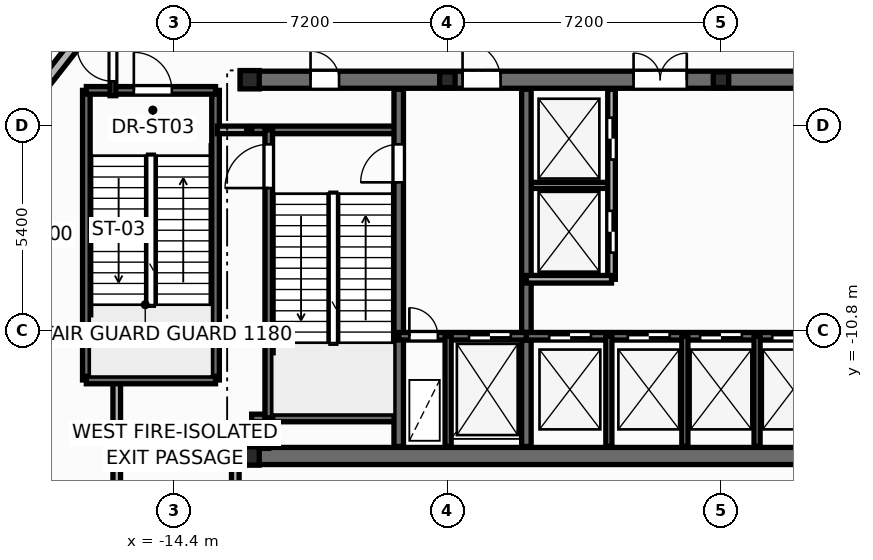
"""IFC4 building model, lengths in metres.
Left out: names, types, materials, properties, quantities, classifications, styles, units other than length and angle.
Written with IfcOpenShell. Run it as: python <this file> out.ifc"""

import sys

from ifc_helpers import new_model, si_unit, direction, frame, frame_2d, origin, origin_2d, place, context, subcontext, project, spatial, rectangle, i_section, extrude, element, fill, save


model = new_model("IFC4")
c1 = context("Model", 3, precision=1e-05, world=origin(), true_north=direction((0.0, 1.0)))
c2 = subcontext(c1, "Body", "Model", "MODEL_VIEW")
j1 = project(units=[si_unit("LENGTHUNIT", "METRE"), si_unit("PLANEANGLEUNIT", "RADIAN")], contexts=[c1])
p1 = place(None, origin())
s1 = spatial("IfcSite", under=j1, at=p1, CompositionType="ELEMENT")
p2 = place(p1, origin())
s2 = spatial("IfcBuilding", under=s1, at=p2, CompositionType="ELEMENT")
p3 = place(p2, origin())
s3 = spatial("IfcBuildingStorey", under=s2, at=p3, CompositionType="ELEMENT", Elevation=0.0)
for number, where, z_axis, x_axis in (
    (1, (-12.4, -14.1, 0.0), (0.0, 0.0, 1.0), (1.0, 0.0, 0.0)),
    (2, (-12.4, -4.2, 0.0), (0.0, 0.0, 1.0), (1.0, 0.0, 0.0)),
):
    element("IfcColumn", number, at=place(p3, frame(where, z_axis=z_axis, x_axis=x_axis)), inside=s3, PredefinedType="COLUMN", context=c2, shape_type="SweptSolid", body=[
        extrude(i_section(OverallWidth=0.5, OverallDepth=0.482, WebThickness=0.04, FlangeThickness=0.045, at=origin_2d()), origin(), (0.0, 0.0, 1.0), 5.4),
    ])
for number, where, z_axis, x_axis in (
    (3, (-7.2, -4.2, 0.0), (0.0, 0.0, 1.0), (1.0, 0.0, 0.0)),
    (4, (0.0, -4.2, 0.0), (0.0, 0.0, 1.0), (1.0, 0.0, 0.0)),
):
    element("IfcColumn", number, at=place(p3, frame(where, z_axis=z_axis, x_axis=x_axis)), inside=s3, PredefinedType="PILASTER", context=c2, shape_type="SweptSolid", body=[
        extrude(i_section(OverallWidth=0.405, OverallDepth=0.414, WebThickness=0.022, FlangeThickness=0.032, at=origin_2d()), origin(), (0.0, 0.0, 1.0), 5.4),
    ])
p4 = place(p3, frame((-23.245, -11.24, -0.015), z_axis=(0.0, 0.0, 1.0), x_axis=(0.616945483616, 0.787005889588, 0.0)))
e5 = element("IfcWall", 5, at=p4, inside=s3, PredefinedType="STANDARD", context=c2, shape_type="SweptSolid", body=[
    extrude(rectangle(XDim=28.627, YDim=0.28, at=frame_2d((14.314, 0.0))), origin(), (0.0, 0.0, 1.0), 3.91),
])
p5 = place(p3, frame((-5.12, -6.98, 0.0), z_axis=(0.0, 0.0, 1.0), x_axis=(1.0, 0.0, 0.0)))
e6 = element("IfcWall", 6, at=p5, inside=s3, PredefinedType="PARTITIONING", context=c2, shape_type="SweptSolid", body=[
    extrude(rectangle(XDim=2.24, YDim=0.16, at=frame_2d((1.12, 0.0))), origin(), (0.0, 0.0, 1.0), 5.12),
])
p6 = place(p3, frame((-12.75, -14.1, 0.0), z_axis=(0.0, 0.0, 1.0), x_axis=(1.0, 0.0, 0.0)))
e7 = element("IfcWall", 7, at=p6, inside=s3, PredefinedType="SHEAR", context=c2, shape_type="SweptSolid", body=[
    extrude(rectangle(XDim=25.5, YDim=0.45, at=frame_2d((12.75, 0.0))), origin(), (0.0, 0.0, 1.0), 5.4),
])
p7 = place(p3, frame((-12.65, -4.2, 0.0), z_axis=(0.0, 0.0, 1.0), x_axis=(1.0, 0.0, 0.0)))
e8 = element("IfcWall", 8, at=p7, inside=s3, PredefinedType="SHEAR", context=c2, shape_type="SweptSolid", body=[
    extrude(rectangle(XDim=25.3, YDim=0.45, at=frame_2d((12.65, 0.0))), origin(), (0.0, 0.0, 1.0), 5.4),
])
p8 = place(p7, frame((1.85, 0.0, 0.0)))
e9 = element("IfcOpeningElement", 9, at=p8, cuts=e8, PredefinedType="OPENING", context=c2, shape_type="SweptSolid", body=[
    extrude(rectangle(XDim=0.756, YDim=2.054, at=frame_2d((0.375, 1.027))), frame((0.0, 0.235, 0.0), z_axis=(0.0, -1.0, 0.0), x_axis=(1.0, 0.0, 0.0)), (0.0, 0.0, 1.0), 0.47),
])
p9 = place(p7, frame((22.65, 0.0, 0.0)))
e10 = element("IfcOpeningElement", 10, at=p9, cuts=e8, PredefinedType="OPENING", context=c2, shape_type="SweptSolid", body=[
    extrude(rectangle(XDim=0.756, YDim=2.054, at=frame_2d((0.375, 1.027))), frame((0.0, 0.235, 0.0), z_axis=(0.0, -1.0, 0.0), x_axis=(1.0, 0.0, 0.0)), (0.0, 0.0, 1.0), 0.47),
])
p10 = place(p7, frame((5.85, 0.0, 0.0)))
e11 = element("IfcOpeningElement", 11, at=p10, cuts=e8, PredefinedType="OPENING", context=c2, shape_type="SweptSolid", body=[
    extrude(rectangle(XDim=1.006, YDim=2.104, at=frame_2d((0.5, 1.052))), frame((0.0, 0.235, 0.0), z_axis=(0.0, -1.0, 0.0), x_axis=(1.0, 0.0, 0.0)), (0.0, 0.0, 1.0), 0.47),
])
p11 = place(p7, frame((10.35, 0.0, 0.0)))
e12 = element("IfcOpeningElement", 12, at=p11, cuts=e8, PredefinedType="OPENING", context=c2, shape_type="SweptSolid", body=[
    extrude(rectangle(XDim=1.406, YDim=2.154, at=frame_2d((0.7, 1.077))), frame((0.0, 0.235, 0.0), z_axis=(0.0, -1.0, 0.0), x_axis=(1.0, 0.0, 0.0)), (0.0, 0.0, 1.0), 0.47),
])
p12 = place(p7, frame((18.45, 0.0, 0.0)))
e13 = element("IfcOpeningElement", 13, at=p12, cuts=e8, PredefinedType="OPENING", context=c2, shape_type="SweptSolid", body=[
    extrude(rectangle(XDim=1.006, YDim=2.104, at=frame_2d((0.5, 1.052))), frame((0.0, 0.235, 0.0), z_axis=(0.0, -1.0, 0.0), x_axis=(1.0, 0.0, 0.0)), (0.0, 0.0, 1.0), 0.47),
])
for number, where, z_axis, x_axis in (
    (14, (-12.35, -5.52, 0.0), (0.0, 0.0, 1.0), (1.0, 0.0, 0.0)),
    (15, (-12.35, -13.1, 0.0), (0.0, 0.0, 1.0), (1.0, 0.0, 0.0)),
):
    element("IfcWall", number, at=place(p3, frame(where, z_axis=z_axis, x_axis=x_axis)), inside=s3, PredefinedType="SOLIDWALL", context=c2, shape_type="SweptSolid", body=[
        extrude(rectangle(XDim=3.87, YDim=0.2, at=frame_2d((1.935, 0.0))), origin(), (0.0, 0.0, 1.0), 5.4),
    ])
p13 = place(p3, frame((-11.9, -13.1, 0.0), z_axis=(0.0, 0.0, 1.0), x_axis=(0.0, 1.0, 0.0)))
e16 = element("IfcWall", 16, at=p13, inside=s3, PredefinedType="SOLIDWALL", context=c2, shape_type="SweptSolid", body=[
    extrude(rectangle(XDim=7.58, YDim=0.2, at=frame_2d((3.79, 0.0))), origin(), (0.0, 0.0, 1.0), 5.4),
])
p14 = place(p13, frame((6.05, 0.0, 0.0)))
e17 = element("IfcOpeningElement", 17, at=p14, cuts=e16, PredefinedType="OPENING", context=c2, shape_type="SweptSolid", body=[
    extrude(rectangle(XDim=1.156, YDim=2.154, at=frame_2d((0.575, 1.077))), frame((0.0, 0.11, 0.0), z_axis=(0.0, -1.0, 0.0), x_axis=(1.0, 0.0, 0.0)), (0.0, 0.0, 1.0), 0.22),
])
p15 = place(p3, frame((-8.48, -13.85, 0.0), z_axis=(0.0, 0.0, 1.0), x_axis=(0.0, 1.0, 0.0)))
e18 = element("IfcWall", 18, at=p15, inside=s3, PredefinedType="SHEAR", context=c2, shape_type="SweptSolid", body=[
    extrude(rectangle(XDim=9.4, YDim=0.25, at=frame_2d((4.7, 0.0))), origin(), (0.0, 0.0, 1.0), 5.4),
])
p16 = place(p15, frame((6.95, 0.0, 0.0)))
e19 = element("IfcOpeningElement", 19, at=p16, cuts=e18, PredefinedType="OPENING", context=c2, shape_type="SweptSolid", body=[
    extrude(rectangle(XDim=1.006, YDim=2.104, at=frame_2d((0.5, 1.052))), frame((0.0, 0.135, 0.0), z_axis=(0.0, -1.0, 0.0), x_axis=(1.0, 0.0, 0.0)), (0.0, 0.0, 1.0), 0.27),
])
p17 = place(p3, frame((-5.12, -13.85, 0.0), z_axis=(0.0, 0.0, 1.0), x_axis=(0.0, 1.0, 0.0)))
e20 = element("IfcWall", 20, at=p17, inside=s3, PredefinedType="SHEAR", context=c2, shape_type="SweptSolid", body=[
    extrude(rectangle(XDim=9.4, YDim=0.25, at=frame_2d((4.7, 0.0))), origin(), (0.0, 0.0, 1.0), 5.4),
])
p18 = place(p3, frame((-8.48, -10.95, 0.0), z_axis=(0.0, 0.0, 1.0), x_axis=(1.0, 0.0, 0.0)))
e21 = element("IfcWall", 21, at=p18, inside=s3, PredefinedType="SOLIDWALL", context=c2, shape_type="SweptSolid", body=[
    extrude(rectangle(XDim=3.36, YDim=0.2, at=frame_2d((1.68, 0.0))), origin(), (0.0, 0.0, 1.0), 5.4),
])
p19 = place(p18, frame((0.28, 0.0, 0.0)))
e22 = element("IfcOpeningElement", 22, at=p19, cuts=e21, PredefinedType="OPENING", context=c2, shape_type="SweptSolid", body=[
    extrude(rectangle(XDim=0.756, YDim=2.054, at=frame_2d((0.375, 1.027))), frame((0.0, 0.11, 0.0), z_axis=(0.0, -1.0, 0.0), x_axis=(1.0, 0.0, 0.0)), (0.0, 0.0, 1.0), 0.22),
])
p20 = place(p18, frame((1.85, 0.0, 0.0)))
e23 = element("IfcOpeningElement", 23, at=p20, cuts=e21, PredefinedType="OPENING", context=c2, shape_type="SweptSolid", body=[
    extrude(rectangle(XDim=1.106, YDim=2.104, at=frame_2d((0.55, 1.052))), frame((0.0, 0.11, 0.0), z_axis=(0.0, -1.0, 0.0), x_axis=(1.0, 0.0, 0.0)), (0.0, 0.0, 1.0), 0.22),
])
p21 = place(p3, frame((-5.12, -10.95, 0.0), z_axis=(0.0, 0.0, 1.0), x_axis=(1.0, 0.0, 0.0)))
e24 = element("IfcWall", 24, at=p21, inside=s3, PredefinedType="SOLIDWALL", context=c2, shape_type="SweptSolid", body=[
    extrude(rectangle(XDim=10.24, YDim=0.2, at=frame_2d((5.12, 0.0))), origin(), (0.0, 0.0, 1.0), 5.4),
])
p22 = place(p21, frame((0.6, 0.0, 0.0)))
e25 = element("IfcOpeningElement", 25, at=p22, cuts=e24, PredefinedType="OPENING", context=c2, shape_type="SweptSolid", body=[
    extrude(rectangle(XDim=1.106, YDim=2.104, at=frame_2d((0.55, 1.052))), frame((0.0, 0.11, 0.0), z_axis=(0.0, -1.0, 0.0), x_axis=(1.0, 0.0, 0.0)), (0.0, 0.0, 1.0), 0.22),
])
p23 = place(p21, frame((2.67, 0.0, 0.0)))
e26 = element("IfcOpeningElement", 26, at=p23, cuts=e24, PredefinedType="OPENING", context=c2, shape_type="SweptSolid", body=[
    extrude(rectangle(XDim=1.106, YDim=2.104, at=frame_2d((0.55, 1.052))), frame((0.0, 0.11, 0.0), z_axis=(0.0, -1.0, 0.0), x_axis=(1.0, 0.0, 0.0)), (0.0, 0.0, 1.0), 0.22),
])
p24 = place(p21, frame((4.57, 0.0, 0.0)))
e27 = element("IfcOpeningElement", 27, at=p24, cuts=e24, PredefinedType="OPENING", context=c2, shape_type="SweptSolid", body=[
    extrude(rectangle(XDim=1.106, YDim=2.104, at=frame_2d((0.55, 1.052))), frame((0.0, 0.11, 0.0), z_axis=(0.0, -1.0, 0.0), x_axis=(1.0, 0.0, 0.0)), (0.0, 0.0, 1.0), 0.22),
])
p25 = place(p21, frame((6.47, 0.0, 0.0)))
e28 = element("IfcOpeningElement", 28, at=p25, cuts=e24, PredefinedType="OPENING", context=c2, shape_type="SweptSolid", body=[
    extrude(rectangle(XDim=1.106, YDim=2.104, at=frame_2d((0.55, 1.052))), frame((0.0, 0.11, 0.0), z_axis=(0.0, -1.0, 0.0), x_axis=(1.0, 0.0, 0.0)), (0.0, 0.0, 1.0), 0.22),
])
p26 = place(p21, frame((8.54, 0.0, 0.0)))
e29 = element("IfcOpeningElement", 29, at=p26, cuts=e24, PredefinedType="OPENING", context=c2, shape_type="SweptSolid", body=[
    extrude(rectangle(XDim=1.106, YDim=2.104, at=frame_2d((0.55, 1.052))), frame((0.0, 0.11, 0.0), z_axis=(0.0, -1.0, 0.0), x_axis=(1.0, 0.0, 0.0)), (0.0, 0.0, 1.0), 0.22),
])
for number, where, z_axis, x_axis in (
    (30, (-7.18, -13.85, 0.0), (0.0, 0.0, 1.0), (0.0, 1.0, 0.0)),
    (31, (-2.95, -13.85, 0.0), (0.0, 0.0, 1.0), (0.0, 1.0, 0.0)),
):
    element("IfcWall", number, at=place(p3, frame(where, z_axis=z_axis, x_axis=x_axis)), inside=s3, PredefinedType="PARTITIONING", context=c2, shape_type="SweptSolid", body=[
        extrude(rectangle(XDim=2.9, YDim=0.16, at=frame_2d((1.45, 0.0))), origin(), (0.0, 0.0, 1.0), 4.145),
    ])
p27 = place(p3, frame((-2.88, -9.45, 0.0), z_axis=(0.0, 0.0, 1.0), x_axis=(0.0, 1.0, 0.0)))
e32 = element("IfcWall", 32, at=p27, inside=s3, PredefinedType="SOLIDWALL", context=c2, shape_type="SweptSolid", body=[
    extrude(rectangle(XDim=5.0, YDim=0.2, at=frame_2d((2.5, 0.0))), origin(), (0.0, 0.0, 1.0), 5.12),
])
p28 = place(p27, frame((0.7, 0.0, 0.0)))
e33 = element("IfcOpeningElement", 33, at=p28, cuts=e32, PredefinedType="OPENING", context=c2, shape_type="SweptSolid", body=[
    extrude(rectangle(XDim=1.106, YDim=2.104, at=frame_2d((0.55, 1.052))), frame((0.0, 0.11, 0.0), z_axis=(0.0, -1.0, 0.0), x_axis=(1.0, 0.0, 0.0)), (0.0, 0.0, 1.0), 0.22),
])
p29 = place(p27, frame((3.15, 0.0, 0.0)))
e34 = element("IfcOpeningElement", 34, at=p29, cuts=e32, PredefinedType="OPENING", context=c2, shape_type="SweptSolid", body=[
    extrude(rectangle(XDim=1.106, YDim=2.104, at=frame_2d((0.55, 1.052))), frame((0.0, 0.11, 0.0), z_axis=(0.0, -1.0, 0.0), x_axis=(1.0, 0.0, 0.0)), (0.0, 0.0, 1.0), 0.22),
])
p30 = place(p3, frame((-5.12, -9.45, 0.0), z_axis=(0.0, 0.0, 1.0), x_axis=(1.0, 0.0, 0.0)))
e35 = element("IfcWall", 35, at=p30, inside=s3, PredefinedType="SOLIDWALL", context=c2, shape_type="SweptSolid", body=[
    extrude(rectangle(XDim=2.24, YDim=0.2, at=frame_2d((1.12, 0.0))), origin(), (0.0, 0.0, 1.0), 5.12),
])
for number, where, z_axis, x_axis in (
    (36, (-0.95, -13.85, 0.0), (0.0, 0.0, 1.0), (0.0, 1.0, 0.0)),
    (37, (0.95, -13.85, 0.0), (0.0, 0.0, 1.0), (0.0, 1.0, 0.0)),
):
    element("IfcWall", number, at=place(p3, frame(where, z_axis=z_axis, x_axis=x_axis)), inside=s3, PredefinedType="PARTITIONING", context=c2, shape_type="SweptSolid", body=[
        extrude(rectangle(XDim=2.9, YDim=0.16, at=frame_2d((1.45, 0.0))), origin(), (0.0, 0.0, 1.0), 4.145),
    ])
for number, where, z_axis, x_axis in (
    (38, (-16.7, -12.1, 0.0), (0.0, 0.0, 1.0), (0.0, 1.0, 0.0)),
    (39, (-13.3, -12.1, 0.0), (0.0, 0.0, 1.0), (0.0, 1.0, 0.0)),
):
    element("IfcWall", number, at=place(p3, frame(where, z_axis=z_axis, x_axis=x_axis)), inside=s3, PredefinedType="SOLIDWALL", context=c2, shape_type="SweptSolid", body=[
        extrude(rectangle(XDim=7.62, YDim=0.2, at=frame_2d((3.81, 0.0))), origin(), (0.0, 0.0, 1.0), 5.4),
    ])
p31 = place(p3, frame((-22.862, -10.8, 0.0), z_axis=(0.0, 0.0, 1.0), x_axis=(1.0, 0.0, 0.0)))
e40 = element("IfcWall", 40, at=p31, inside=s3, PredefinedType="PARTITIONING", context=c2, shape_type="SweptSolid", body=[
    extrude(rectangle(XDim=6.222, YDim=0.15, at=frame_2d((3.111, 0.0))), origin(), (0.0, 0.0, 1.0), 5.12),
])
p32 = place(p31, frame((0.758, 0.0, 0.0)))
e41 = element("IfcOpeningElement", 41, at=p32, cuts=e40, PredefinedType="OPENING", context=c2, shape_type="SweptSolid", body=[
    extrude(rectangle(XDim=0.956, YDim=2.104, at=frame_2d((0.475, 1.052))), frame((0.0, 0.085, 0.0), z_axis=(0.0, -1.0, 0.0), x_axis=(1.0, 0.0, 0.0)), (0.0, 0.0, 1.0), 0.17),
])
p33 = place(p3, frame((-15.9, -17.85, 0.0), z_axis=(0.0, 0.0, 1.0), x_axis=(0.0, 1.0, 0.0)))
e42 = element("IfcWall", 42, at=p33, inside=s3, PredefinedType="SOLIDWALL", context=c2, shape_type="SweptSolid", body=[
    extrude(rectangle(XDim=5.73, YDim=0.2, at=frame_2d((2.865, 0.0))), origin(), (0.0, 0.0, 1.0), 5.12),
])
p34 = place(p3, frame((-12.78, -17.85, 0.0), z_axis=(0.0, 0.0, 1.0), x_axis=(0.0, 1.0, 0.0)))
e43 = element("IfcWall", 43, at=p34, inside=s3, PredefinedType="SOLIDWALL", context=c2, shape_type="SweptSolid", body=[
    extrude(rectangle(XDim=4.05, YDim=0.2, at=frame_2d((2.025, 0.0))), origin(), (0.0, 0.0, 1.0), 5.12),
])
p35 = place(p3, frame((-16.7, -12.1, 0.0), z_axis=(0.0, 0.0, 1.0), x_axis=(1.0, 0.0, 0.0)))
e44 = element("IfcWall", 44, at=p35, inside=s3, PredefinedType="SOLIDWALL", context=c2, shape_type="SweptSolid", body=[
    extrude(rectangle(XDim=3.4, YDim=0.2, at=frame_2d((1.7, 0.0))), origin(), (0.0, 0.0, 1.0), 5.4),
])
p36 = place(p3, frame((-16.7, -4.48, 0.0), z_axis=(0.0, 0.0, 1.0), x_axis=(1.0, 0.0, 0.0)))
e45 = element("IfcWall", 45, at=p36, inside=s3, PredefinedType="SOLIDWALL", context=c2, shape_type="SweptSolid", body=[
    extrude(rectangle(XDim=3.4, YDim=0.2, at=frame_2d((1.7, 0.0))), origin(), (0.0, 0.0, 1.0), 5.4),
])
p37 = place(p36, frame((1.25, 0.0, 0.0)))
e46 = element("IfcOpeningElement", 46, at=p37, cuts=e45, PredefinedType="OPENING", context=c2, shape_type="SweptSolid", body=[
    extrude(rectangle(XDim=1.006, YDim=2.104, at=frame_2d((0.5, 1.052))), frame((0.0, 0.11, 0.0), z_axis=(0.0, -1.0, 0.0), x_axis=(1.0, 0.0, 0.0)), (0.0, 0.0, 1.0), 0.22),
])
p38 = place(p3, frame((-16.0, -4.62, 0.0), z_axis=(0.0, 0.0, 1.0), x_axis=(0.0, 1.0, 0.0)))
e47 = element("IfcWall", 47, at=p38, inside=s3, PredefinedType="PARTITIONING", context=c2, shape_type="SweptSolid", body=[
    extrude(rectangle(XDim=2.573, YDim=0.15, at=frame_2d((1.287, 0.0))), origin(), (0.0, 0.0, 1.0), 5.12),
])
p39 = place(p38, frame((0.379, 0.0, 0.0)))
e48 = element("IfcOpeningElement", 48, at=p39, cuts=e47, PredefinedType="OPENING", context=c2, shape_type="SweptSolid", body=[
    extrude(rectangle(XDim=0.956, YDim=2.104, at=frame_2d((0.475, 1.052))), frame((0.0, 0.085, 0.0), z_axis=(0.0, -1.0, 0.0), x_axis=(1.0, 0.0, 0.0)), (0.0, 0.0, 1.0), 0.17),
])
p40 = place(p3, frame((-12.78, -13.8, 0.0), z_axis=(0.0, 0.0, 1.0), x_axis=(1.0, 0.0, 0.0)))
e49 = element("IfcWall", 49, at=p40, inside=s3, PredefinedType="SOLIDWALL", context=c2, shape_type="SweptSolid", body=[
    extrude(rectangle(XDim=0.88, YDim=0.2, at=frame_2d((0.44, 0.0))), origin(), (0.0, 0.0, 1.0), 4.483),
])
p41 = place(p3, frame((-13.25, -5.52, 0.0), z_axis=(0.0, 0.0, 1.0), x_axis=(1.0, 0.0, 0.0)))
e50 = element("IfcWall", 50, at=p41, inside=s3, PredefinedType="SOLIDWALL", context=c2, shape_type="SweptSolid", body=[
    extrude(rectangle(XDim=0.77, YDim=0.2, at=frame_2d((0.385, 0.0))), origin(), (0.0, 0.0, 1.0), 4.483),
])
p42 = place(p3, frame((-11.9, -13.8, 0.0), z_axis=(0.0, 0.0, 1.0), x_axis=(0.0, 1.0, 0.0)))
e51 = element("IfcWall", 51, at=p42, inside=s3, PredefinedType="SOLIDWALL", context=c2, shape_type="SweptSolid", body=[
    extrude(rectangle(XDim=0.7, YDim=0.2, at=frame_2d((0.35, 0.0))), origin(), (0.0, 0.0, 1.0), 5.12),
])
p43 = place(p28, origin())
e52 = element("IfcDoor", 52, at=p43, inside=s3, OperationType="DOUBLE_DOOR_SLIDING", PredefinedType="DOOR", context=c2, shape_type="SweptSolid", body=[
    extrude(rectangle(XDim=1.1, YDim=2.1, at=frame_2d((0.55, 1.05))), frame((0.0, 0.025, 0.0), z_axis=(0.0, -1.0, 0.0), x_axis=(1.0, 0.0, 0.0)), (0.0, 0.0, 1.0), 0.05),
])
fill(e33, e52)
p44 = place(p29, origin())
e53 = element("IfcDoor", 53, at=p44, inside=s3, OperationType="DOUBLE_DOOR_SLIDING", PredefinedType="DOOR", context=c2, shape_type="SweptSolid", body=[
    extrude(rectangle(XDim=1.1, YDim=2.1, at=frame_2d((0.55, 1.05))), frame((0.0, 0.025, 0.0), z_axis=(0.0, -1.0, 0.0), x_axis=(1.0, 0.0, 0.0)), (0.0, 0.0, 1.0), 0.05),
])
fill(e34, e53)
p45 = place(p16, origin())
e54 = element("IfcDoor", 54, at=p45, inside=s3, OperationType="SINGLE_SWING_LEFT", PredefinedType="DOOR", context=c2, shape_type="SweptSolid", body=[
    extrude(rectangle(XDim=1.0, YDim=2.1, at=frame_2d((0.5, 1.05))), frame((0.0, 0.025, 0.0), z_axis=(0.0, -1.0, 0.0), x_axis=(1.0, 0.0, 0.0)), (0.0, 0.0, 1.0), 0.05),
])
fill(e19, e54)
p46 = place(p14, origin())
e55 = element("IfcDoor", 55, at=p46, inside=s3, OperationType="SINGLE_SWING_LEFT", PredefinedType="DOOR", context=c2, shape_type="SweptSolid", body=[
    extrude(rectangle(XDim=1.15, YDim=2.15, at=frame_2d((0.575, 1.075))), frame((0.0, 0.025, 0.0), z_axis=(0.0, -1.0, 0.0), x_axis=(1.0, 0.0, 0.0)), (0.0, 0.0, 1.0), 0.05),
])
fill(e17, e55)
p47 = place(p19, origin())
e56 = element("IfcDoor", 56, at=p47, inside=s3, OperationType="SINGLE_SWING_LEFT", PredefinedType="DOOR", context=c2, shape_type="SweptSolid", body=[
    extrude(rectangle(XDim=0.75, YDim=2.05, at=frame_2d((0.375, 1.025))), frame((0.0, 0.025, 0.0), z_axis=(0.0, -1.0, 0.0), x_axis=(1.0, 0.0, 0.0)), (0.0, 0.0, 1.0), 0.05),
])
fill(e22, e56)
p48 = place(p20, origin())
e57 = element("IfcDoor", 57, at=p48, inside=s3, OperationType="DOUBLE_DOOR_SLIDING", PredefinedType="DOOR", context=c2, shape_type="SweptSolid", body=[
    extrude(rectangle(XDim=1.1, YDim=2.1, at=frame_2d((0.55, 1.05))), frame((0.0, 0.025, 0.0), z_axis=(0.0, -1.0, 0.0), x_axis=(1.0, 0.0, 0.0)), (0.0, 0.0, 1.0), 0.05),
])
fill(e23, e57)
p49 = place(p22, origin())
e58 = element("IfcDoor", 58, at=p49, inside=s3, OperationType="DOUBLE_DOOR_SLIDING", PredefinedType="DOOR", context=c2, shape_type="SweptSolid", body=[
    extrude(rectangle(XDim=1.1, YDim=2.1, at=frame_2d((0.55, 1.05))), frame((0.0, 0.025, 0.0), z_axis=(0.0, -1.0, 0.0), x_axis=(1.0, 0.0, 0.0)), (0.0, 0.0, 1.0), 0.05),
])
fill(e25, e58)
p50 = place(p23, origin())
e59 = element("IfcDoor", 59, at=p50, inside=s3, OperationType="DOUBLE_DOOR_SLIDING", PredefinedType="DOOR", context=c2, shape_type="SweptSolid", body=[
    extrude(rectangle(XDim=1.1, YDim=2.1, at=frame_2d((0.55, 1.05))), frame((0.0, 0.025, 0.0), z_axis=(0.0, -1.0, 0.0), x_axis=(1.0, 0.0, 0.0)), (0.0, 0.0, 1.0), 0.05),
])
fill(e26, e59)
p51 = place(p24, origin())
e60 = element("IfcDoor", 60, at=p51, inside=s3, OperationType="DOUBLE_DOOR_SLIDING", PredefinedType="DOOR", context=c2, shape_type="SweptSolid", body=[
    extrude(rectangle(XDim=1.1, YDim=2.1, at=frame_2d((0.55, 1.05))), frame((0.0, 0.025, 0.0), z_axis=(0.0, -1.0, 0.0), x_axis=(1.0, 0.0, 0.0)), (0.0, 0.0, 1.0), 0.05),
])
fill(e27, e60)
p52 = place(p25, origin())
e61 = element("IfcDoor", 61, at=p52, inside=s3, OperationType="DOUBLE_DOOR_SLIDING", PredefinedType="DOOR", context=c2, shape_type="SweptSolid", body=[
    extrude(rectangle(XDim=1.1, YDim=2.1, at=frame_2d((0.55, 1.05))), frame((0.0, 0.025, 0.0), z_axis=(0.0, -1.0, 0.0), x_axis=(1.0, 0.0, 0.0)), (0.0, 0.0, 1.0), 0.05),
])
fill(e28, e61)
p53 = place(p8, origin())
e62 = element("IfcDoor", 62, at=p53, inside=s3, OperationType="SINGLE_SWING_LEFT", PredefinedType="DOOR", context=c2, shape_type="SweptSolid", body=[
    extrude(rectangle(XDim=0.75, YDim=2.05, at=frame_2d((0.375, 1.025))), frame((0.0, 0.025, 0.0), z_axis=(0.0, -1.0, 0.0), x_axis=(1.0, 0.0, 0.0)), (0.0, 0.0, 1.0), 0.05),
])
fill(e9, e62)
p54 = place(p10, origin())
e63 = element("IfcDoor", 63, at=p54, inside=s3, OperationType="SINGLE_SWING_LEFT", PredefinedType="DOOR", context=c2, shape_type="SweptSolid", body=[
    extrude(rectangle(XDim=1.0, YDim=2.1, at=frame_2d((0.5, 1.05))), frame((0.0, 0.025, 0.0), z_axis=(0.0, -1.0, 0.0), x_axis=(1.0, 0.0, 0.0)), (0.0, 0.0, 1.0), 0.05),
])
fill(e11, e63)
p55 = place(p11, origin())
e64 = element("IfcDoor", 64, at=p55, inside=s3, OperationType="DOUBLE_DOOR_SINGLE_SWING", PredefinedType="DOOR", context=c2, shape_type="SweptSolid", body=[
    extrude(rectangle(XDim=1.4, YDim=2.15, at=frame_2d((0.7, 1.075))), frame((0.0, 0.025, 0.0), z_axis=(0.0, -1.0, 0.0), x_axis=(1.0, 0.0, 0.0)), (0.0, 0.0, 1.0), 0.05),
])
fill(e12, e64)
p56 = place(p37, origin())
e65 = element("IfcDoor", 65, at=p56, inside=s3, OperationType="SINGLE_SWING_LEFT", PredefinedType="DOOR", context=c2, shape_type="SweptSolid", body=[
    extrude(rectangle(XDim=1.0, YDim=2.1, at=frame_2d((0.5, 1.05))), frame((0.0, 0.025, 0.0), z_axis=(0.0, -1.0, 0.0), x_axis=(1.0, 0.0, 0.0)), (0.0, 0.0, 1.0), 0.05),
])
fill(e46, e65)
p57 = place(p39, origin())
e66 = element("IfcDoor", 66, at=p57, inside=s3, OperationType="SINGLE_SWING_RIGHT", PredefinedType="DOOR", context=c2, shape_type="SweptSolid", body=[
    extrude(rectangle(XDim=0.95, YDim=2.1, at=frame_2d((0.475, 1.05))), frame((0.0, 0.025, 0.0), z_axis=(0.0, -1.0, 0.0), x_axis=(1.0, 0.0, 0.0)), (0.0, 0.0, 1.0), 0.05),
])
fill(e48, e66)
save(model, sys.argv[1])
